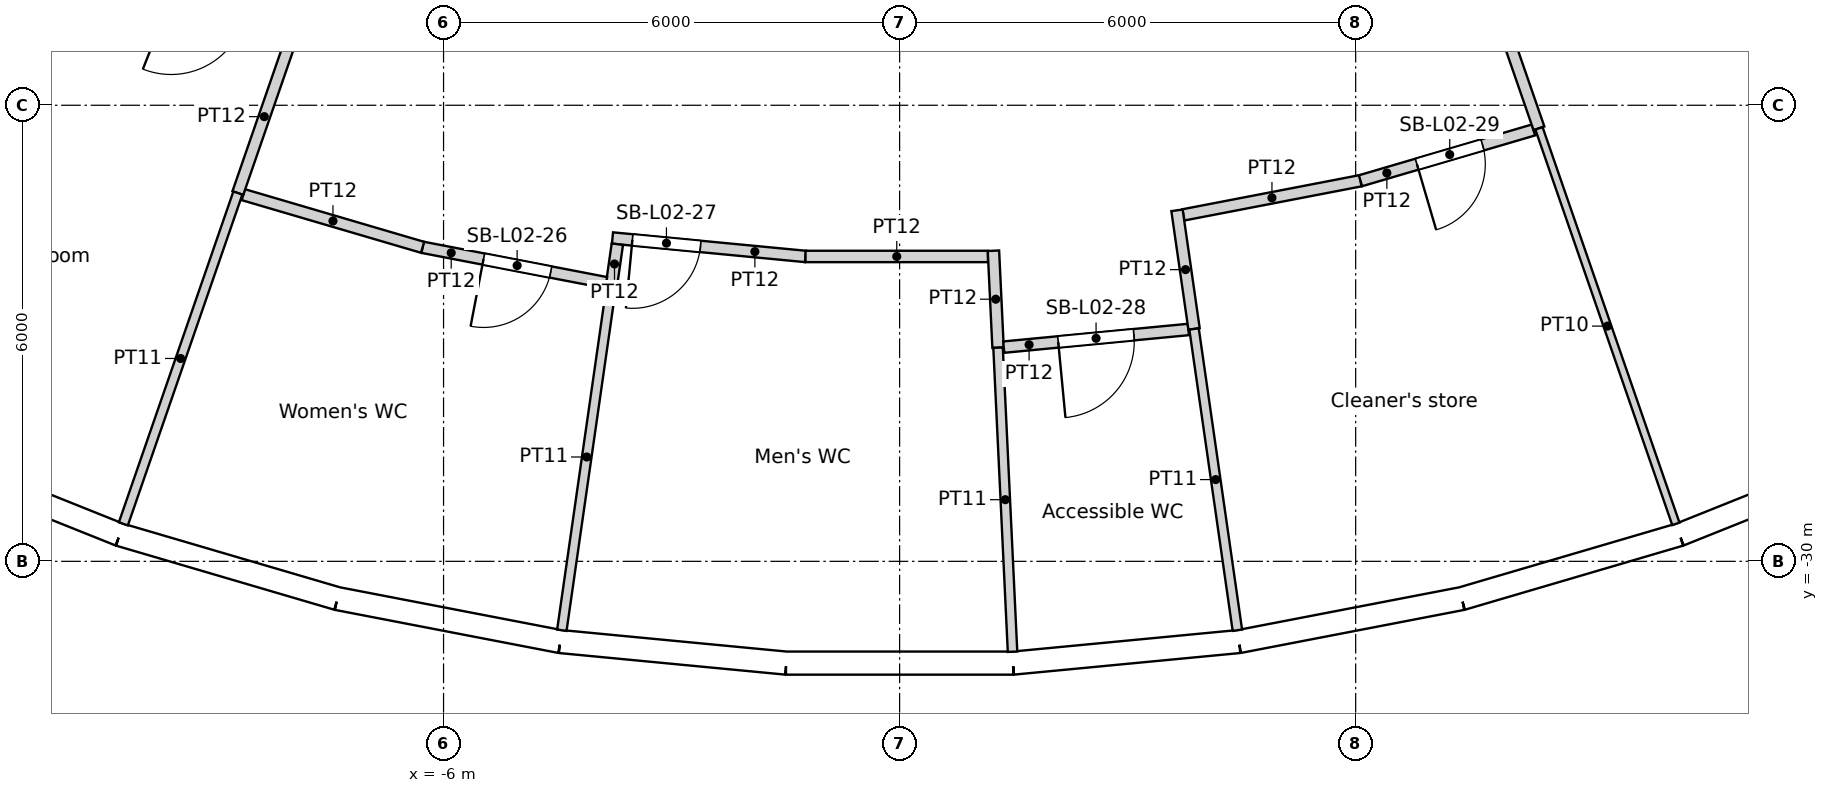
"""IFC4 building model, lengths in metres.
Left out: names, types, materials, properties, quantities, classifications, styles, units other than length and angle.
Written with IfcOpenShell. Run it as: python <this file> out.ifc"""

import sys

from ifc_helpers import new_model, si_unit, direction, frame, frame_2d, origin, origin_2d, place, context, subcontext, project, spatial, rectangle, circle, extrude, element, fill, save


model = new_model("IFC4")
c1 = context("Model", 3, precision=1e-05, world=origin(), true_north=direction((0.0, 1.0)))
c2 = subcontext(c1, "Body", "Model", "MODEL_VIEW")
j1 = project(units=[si_unit("LENGTHUNIT", "METRE"), si_unit("PLANEANGLEUNIT", "RADIAN")], contexts=[c1])
p1 = place(None, origin())
s1 = spatial("IfcSite", under=j1, at=p1, CompositionType="ELEMENT")
p2 = place(p1, origin())
s2 = spatial("IfcBuilding", under=s1, at=p2, CompositionType="ELEMENT")
p3 = place(p2, frame((0.0, 0.0, 13.8)))
s3 = spatial("IfcBuildingStorey", under=s2, at=p3, CompositionType="ELEMENT", Elevation=13.8)
for number, where, z_axis, x_axis in (
    (1, (-9.902, -28.61, 0.0), (0.0, 0.0, 1.0), (1.0, 0.0, 0.0)),
    (2, (-4.309, -29.966, 0.0), (0.0, 0.0, 1.0), (1.0, 0.0, 0.0)),
    (3, (1.44, -30.24, 0.0), (0.0, 0.0, 1.0), (1.0, 0.0, 0.0)),
    (4, (7.137, -29.421, 0.0), (0.0, 0.0, 1.0), (1.0, 0.0, 0.0)),
):
    element("IfcColumn", number, at=place(p3, frame(where, z_axis=z_axis, x_axis=x_axis)), inside=s3, PredefinedType="COLUMN", context=c2, shape_type="SweptSolid", body=[
        extrude(circle(Radius=0.7, at=origin_2d()), origin(), (0.0, 0.0, 1.0), 4.8),
    ])
for number, where, z_axis, x_axis in (
    (5, (-7.04, -23.516, 0.0), (0.0, 0.0, 1.0), (1.0, 0.0, 0.0)),
    (6, (-1.427, -24.506, 0.0), (0.0, 0.0, 1.0), (1.0, 0.0, 0.0)),
    (7, (4.263, -24.175, 0.0), (0.0, 0.0, 1.0), (1.0, 0.0, 0.0)),
):
    element("IfcColumn", number, at=place(p3, frame(where, z_axis=z_axis, x_axis=x_axis)), inside=s3, PredefinedType="COLUMN", context=c2, shape_type="SweptSolid", body=[
        extrude(circle(Radius=0.75, at=origin_2d()), origin(), (0.0, 0.0, 1.0), 4.8),
    ])
p4 = place(p3, frame((-13.033, -28.539, 0.0), z_axis=(0.0, 0.0, 1.0), x_axis=(0.928380795373, -0.371630325434, 0.0)))
e8 = element("IfcWall", 8, at=p4, inside=s3, PredefinedType="SOLIDWALL", context=c2, shape_type="SweptSolid", body=[
    extrude(rectangle(XDim=2.986, YDim=0.3, at=frame_2d((1.493, 0.0))), origin(), (0.0, 0.0, 1.0), 4.35),
])
p5 = place(p4, frame((1.493, 0.0, 2.0)))
e9 = element("IfcOpeningElement", 9, at=p5, cuts=e8, PredefinedType="OPENING", context=c2, shape_type="SweptSolid", body=[
    extrude(circle(Radius=1.2, at=origin_2d()), frame((0.0, 0.16, 0.0), z_axis=(0.0, -1.0, 0.0), x_axis=(1.0, 0.0, 0.0)), (0.0, 0.0, 1.0), 0.32),
])
p6 = place(p3, frame((-10.261, -29.649, 0.0), z_axis=(0.0, 0.0, 1.0), x_axis=(0.959502108153, -0.281701445593, 0.0)))
e10 = element("IfcWall", 10, at=p6, inside=s3, PredefinedType="SOLIDWALL", context=c2, shape_type="SweptSolid", body=[
    extrude(rectangle(XDim=2.986, YDim=0.3, at=frame_2d((1.493, 0.0))), origin(), (0.0, 0.0, 1.0), 4.35),
])
p7 = place(p6, frame((1.493, 0.0, 2.0)))
e11 = element("IfcOpeningElement", 11, at=p7, cuts=e10, PredefinedType="OPENING", context=c2, shape_type="SweptSolid", body=[
    extrude(circle(Radius=1.2, at=origin_2d()), frame((0.0, 0.16, 0.0), z_axis=(0.0, -1.0, 0.0), x_axis=(1.0, 0.0, 0.0)), (0.0, 0.0, 1.0), 0.32),
])
p8 = place(p3, frame((-7.397, -30.49, 0.0), z_axis=(0.0, 0.0, 1.0), x_axis=(0.981918853666, -0.189302310646, 0.0)))
e12 = element("IfcWall", 12, at=p8, inside=s3, PredefinedType="SOLIDWALL", context=c2, shape_type="SweptSolid", body=[
    extrude(rectangle(XDim=2.986, YDim=0.3, at=frame_2d((1.493, 0.0))), origin(), (0.0, 0.0, 1.0), 4.35),
])
p9 = place(p8, frame((1.493, 0.0, 2.0)))
e13 = element("IfcOpeningElement", 13, at=p9, cuts=e12, PredefinedType="OPENING", context=c2, shape_type="SweptSolid", body=[
    extrude(circle(Radius=1.2, at=origin_2d()), frame((0.0, 0.16, 0.0), z_axis=(0.0, -1.0, 0.0), x_axis=(1.0, 0.0, 0.0)), (0.0, 0.0, 1.0), 0.32),
])
p10 = place(p3, frame((-4.465, -31.055, 0.0), z_axis=(0.0, 0.0, 1.0), x_axis=(0.99547560533, -0.095017467833, 0.0)))
e14 = element("IfcWall", 14, at=p10, inside=s3, PredefinedType="SOLIDWALL", context=c2, shape_type="SweptSolid", body=[
    extrude(rectangle(XDim=2.986, YDim=0.3, at=frame_2d((1.493, 0.0))), origin(), (0.0, 0.0, 1.0), 4.35),
])
p11 = place(p10, frame((1.493, 0.0, 2.0)))
e15 = element("IfcOpeningElement", 15, at=p11, cuts=e14, PredefinedType="OPENING", context=c2, shape_type="SweptSolid", body=[
    extrude(circle(Radius=1.2, at=origin_2d()), frame((0.0, 0.16, 0.0), z_axis=(0.0, -1.0, 0.0), x_axis=(1.0, 0.0, 0.0)), (0.0, 0.0, 1.0), 0.32),
])
p12 = place(p3, frame((-1.493, -31.339, 0.0), z_axis=(0.0, 0.0, 1.0), x_axis=(1.0, 0.0, 0.0)))
e16 = element("IfcWall", 16, at=p12, inside=s3, PredefinedType="SOLIDWALL", context=c2, shape_type="SweptSolid", body=[
    extrude(rectangle(XDim=2.986, YDim=0.3, at=frame_2d((1.493, 0.0))), origin(), (0.0, 0.0, 1.0), 4.35),
])
p13 = place(p12, frame((1.493, 0.0, 2.0)))
e17 = element("IfcOpeningElement", 17, at=p13, cuts=e16, PredefinedType="OPENING", context=c2, shape_type="SweptSolid", body=[
    extrude(circle(Radius=1.2, at=origin_2d()), frame((0.0, 0.16, 0.0), z_axis=(0.0, -1.0, 0.0), x_axis=(1.0, 0.0, 0.0)), (0.0, 0.0, 1.0), 0.32),
])
p14 = place(p3, frame((1.493, -31.339, 0.0), z_axis=(0.0, 0.0, 1.0), x_axis=(0.99547560533, 0.095017467833, 0.0)))
e18 = element("IfcWall", 18, at=p14, inside=s3, PredefinedType="SOLIDWALL", context=c2, shape_type="SweptSolid", body=[
    extrude(rectangle(XDim=2.986, YDim=0.3, at=frame_2d((1.493, 0.0))), origin(), (0.0, 0.0, 1.0), 4.35),
])
p15 = place(p14, frame((1.493, 0.0, 2.0)))
e19 = element("IfcOpeningElement", 19, at=p15, cuts=e18, PredefinedType="OPENING", context=c2, shape_type="SweptSolid", body=[
    extrude(circle(Radius=1.2, at=origin_2d()), frame((0.0, 0.16, 0.0), z_axis=(0.0, -1.0, 0.0), x_axis=(1.0, 0.0, 0.0)), (0.0, 0.0, 1.0), 0.32),
])
p16 = place(p3, frame((4.465, -31.055, 0.0), z_axis=(0.0, 0.0, 1.0), x_axis=(0.981918853666, 0.189302310646, 0.0)))
e20 = element("IfcWall", 20, at=p16, inside=s3, PredefinedType="SOLIDWALL", context=c2, shape_type="SweptSolid", body=[
    extrude(rectangle(XDim=2.986, YDim=0.3, at=frame_2d((1.493, 0.0))), origin(), (0.0, 0.0, 1.0), 4.35),
])
p17 = place(p16, frame((1.493, 0.0, 2.0)))
e21 = element("IfcOpeningElement", 21, at=p17, cuts=e20, PredefinedType="OPENING", context=c2, shape_type="SweptSolid", body=[
    extrude(circle(Radius=1.2, at=origin_2d()), frame((0.0, 0.16, 0.0), z_axis=(0.0, -1.0, 0.0), x_axis=(1.0, 0.0, 0.0)), (0.0, 0.0, 1.0), 0.32),
])
p18 = place(p3, frame((7.397, -30.49, 0.0), z_axis=(0.0, 0.0, 1.0), x_axis=(0.959502108153, 0.281701445593, 0.0)))
e22 = element("IfcWall", 22, at=p18, inside=s3, PredefinedType="SOLIDWALL", context=c2, shape_type="SweptSolid", body=[
    extrude(rectangle(XDim=2.986, YDim=0.3, at=frame_2d((1.493, 0.0))), origin(), (0.0, 0.0, 1.0), 4.35),
])
p19 = place(p18, frame((1.493, 0.0, 2.0)))
e23 = element("IfcOpeningElement", 23, at=p19, cuts=e22, PredefinedType="OPENING", context=c2, shape_type="SweptSolid", body=[
    extrude(circle(Radius=1.2, at=origin_2d()), frame((0.0, 0.16, 0.0), z_axis=(0.0, -1.0, 0.0), x_axis=(1.0, 0.0, 0.0)), (0.0, 0.0, 1.0), 0.32),
])
p20 = place(p3, frame((10.261, -29.649, 0.0), z_axis=(0.0, 0.0, 1.0), x_axis=(0.928380795373, 0.371630325434, 0.0)))
e24 = element("IfcWall", 24, at=p20, inside=s3, PredefinedType="SOLIDWALL", context=c2, shape_type="SweptSolid", body=[
    extrude(rectangle(XDim=2.986, YDim=0.3, at=frame_2d((1.493, 0.0))), origin(), (0.0, 0.0, 1.0), 4.35),
])
p21 = place(p20, frame((1.493, 0.0, 2.0)))
e25 = element("IfcOpeningElement", 25, at=p21, cuts=e24, PredefinedType="OPENING", context=c2, shape_type="SweptSolid", body=[
    extrude(circle(Radius=1.2, at=origin_2d()), frame((0.0, 0.16, 0.0), z_axis=(0.0, -1.0, 0.0), x_axis=(1.0, 0.0, 0.0)), (0.0, 0.0, 1.0), 0.32),
])
p22 = place(p3, frame((-10.212, -29.507, 0.0), z_axis=(0.0, 0.0, 1.0), x_axis=(0.327037731194, 0.945011281613, 0.0)))
e26 = element("IfcWall", 26, at=p22, inside=s3, PredefinedType="PARTITIONING", context=c2, shape_type="SweptSolid", body=[
    extrude(rectangle(XDim=4.605, YDim=0.125, at=frame_2d((2.303, 0.0))), origin(), (0.0, 0.0, 1.0), 3.75),
])
p23 = place(p3, frame((-8.706, -25.155, 0.0), z_axis=(0.0, 0.0, 1.0), x_axis=(0.327086912916, 0.944994259982, 0.0)))
e27 = element("IfcWall", 27, at=p23, inside=s3, PredefinedType="PARTITIONING", context=c2, shape_type="SweptSolid", body=[
    extrude(rectangle(XDim=2.127, YDim=0.15, at=frame_2d((1.063, 0.0))), origin(), (0.0, 0.0, 1.0), 3.75),
])
p24 = place(p3, frame((-8.634, -25.176, 0.0), z_axis=(0.0, 0.0, 1.0), x_axis=(0.959512450636, -0.281666215713, 0.0)))
e28 = element("IfcWall", 28, at=p24, inside=s3, PredefinedType="PARTITIONING", context=c2, shape_type="SweptSolid", body=[
    extrude(rectangle(XDim=2.458, YDim=0.15, at=frame_2d((1.229, 0.0))), origin(), (0.0, 0.0, 1.0), 3.75),
])
p25 = place(p3, frame((-3.862, -26.334, 0.0), z_axis=(0.0, 0.0, 1.0), x_axis=(-0.981917073198, 0.189311545773, 0.0)))
e29 = element("IfcWall", 29, at=p25, inside=s3, PredefinedType="PARTITIONING", context=c2, shape_type="SweptSolid", body=[
    extrude(rectangle(XDim=2.458, YDim=0.15, at=frame_2d((1.229, 0.0))), origin(), (0.0, 0.0, 1.0), 3.75),
])
p26 = place(p25, frame((0.741, 0.0, 0.0)))
e30 = element("IfcOpeningElement", 30, at=p26, cuts=e29, PredefinedType="OPENING", context=c2, shape_type="SweptSolid", body=[
    extrude(rectangle(XDim=0.9, YDim=2.1, at=frame_2d((0.45, 1.05))), frame((0.0, 0.075, 0.0), z_axis=(0.0, -1.0, 0.0), x_axis=(1.0, 0.0, 0.0)), (0.0, 0.0, 1.0), 0.15),
])
p27 = place(p3, frame((-4.444, -30.906, 0.0), z_axis=(0.0, 0.0, 1.0), x_axis=(0.142289671733, 0.989825059957, 0.0)))
e31 = element("IfcWall", 31, at=p27, inside=s3, PredefinedType="PARTITIONING", context=c2, shape_type="SweptSolid", body=[
    extrude(rectangle(XDim=4.605, YDim=0.125, at=frame_2d((2.303, 0.0))), origin(), (0.0, 0.0, 1.0), 3.75),
])
p28 = place(p3, frame((-3.788, -26.348, 0.0), z_axis=(0.0, 0.0, 1.0), x_axis=(0.142526194345, 0.989791030433, 0.0)))
e32 = element("IfcWall", 32, at=p28, inside=s3, PredefinedType="PARTITIONING", context=c2, shape_type="SweptSolid", body=[
    extrude(rectangle(XDim=0.526, YDim=0.15, at=frame_2d((0.263, 0.0))), origin(), (0.0, 0.0, 1.0), 3.75),
])
p29 = place(p3, frame((-1.238, -25.989, 0.0), z_axis=(0.0, 0.0, 1.0), x_axis=(-0.995465314717, 0.095125218499, 0.0)))
e33 = element("IfcWall", 33, at=p29, inside=s3, PredefinedType="PARTITIONING", context=c2, shape_type="SweptSolid", body=[
    extrude(rectangle(XDim=2.551, YDim=0.15, at=frame_2d((1.275, 0.0))), origin(), (0.0, 0.0, 1.0), 3.75),
])
p30 = place(p29, frame((1.388, 0.0, 0.0)))
e34 = element("IfcOpeningElement", 34, at=p30, cuts=e33, PredefinedType="OPENING", context=c2, shape_type="SweptSolid", body=[
    extrude(rectangle(XDim=0.9, YDim=2.1, at=frame_2d((0.45, 1.05))), frame((0.0, 0.075, 0.0), z_axis=(0.0, -1.0, 0.0), x_axis=(1.0, 0.0, 0.0)), (0.0, 0.0, 1.0), 0.15),
])
p31 = place(p3, frame((-1.238, -25.989, 0.0), z_axis=(0.0, 0.0, 1.0), x_axis=(1.0, 0.0, 0.0)))
e35 = element("IfcWall", 35, at=p31, inside=s3, PredefinedType="PARTITIONING", context=c2, shape_type="SweptSolid", body=[
    extrude(rectangle(XDim=2.401, YDim=0.15, at=frame_2d((1.201, 0.0))), origin(), (0.0, 0.0, 1.0), 3.75),
])
p32 = place(p3, frame((1.295, -27.189, 0.0), z_axis=(0.0, 0.0, 1.0), x_axis=(-0.047628765126, 0.998865106375, 0.0)))
e36 = element("IfcWall", 36, at=p32, inside=s3, PredefinedType="PARTITIONING", context=c2, shape_type="SweptSolid", body=[
    extrude(rectangle(XDim=1.276, YDim=0.15, at=frame_2d((0.638, 0.0))), origin(), (0.0, 0.0, 1.0), 3.75),
])
p33 = place(p3, frame((3.799, -26.95, 0.0), z_axis=(0.0, 0.0, 1.0), x_axis=(-0.995463491179, -0.095144299509, 0.0)))
e37 = element("IfcWall", 37, at=p33, inside=s3, PredefinedType="PARTITIONING", context=c2, shape_type="SweptSolid", body=[
    extrude(rectangle(XDim=2.44, YDim=0.15, at=frame_2d((1.22, 0.0))), origin(), (0.0, 0.0, 1.0), 3.75),
])
p34 = place(p33, frame((0.72, 0.0, 0.0)))
e38 = element("IfcOpeningElement", 38, at=p34, cuts=e37, PredefinedType="OPENING", context=c2, shape_type="SweptSolid", body=[
    extrude(rectangle(XDim=1.0, YDim=2.1, at=frame_2d((0.5, 1.05))), frame((0.0, 0.075, 0.0), z_axis=(0.0, -1.0, 0.0), x_axis=(1.0, 0.0, 0.0)), (0.0, 0.0, 1.0), 0.15),
])
p35 = place(p3, frame((1.486, -31.189, 0.0), z_axis=(0.0, 0.0, 1.0), x_axis=(-0.047553563093, 0.998868689387, 0.0)))
e39 = element("IfcWall", 39, at=p35, inside=s3, PredefinedType="PARTITIONING", context=c2, shape_type="SweptSolid", body=[
    extrude(rectangle(XDim=4.005, YDim=0.125, at=frame_2d((2.002, 0.0))), origin(), (0.0, 0.0, 1.0), 3.75),
])
p36 = place(p3, frame((3.734, -25.442, 0.0), z_axis=(0.0, 0.0, 1.0), x_axis=(0.981930031272, 0.189244322732, 0.0)))
e40 = element("IfcWall", 40, at=p36, inside=s3, PredefinedType="PARTITIONING", context=c2, shape_type="SweptSolid", body=[
    extrude(rectangle(XDim=2.373, YDim=0.15, at=frame_2d((1.186, 0.0))), origin(), (0.0, 0.0, 1.0), 3.75),
])
p37 = place(p3, frame((3.874, -26.943, 0.0), z_axis=(0.0, 0.0, 1.0), x_axis=(-0.142310157012, 0.989822114933, 0.0)))
e41 = element("IfcWall", 41, at=p37, inside=s3, PredefinedType="PARTITIONING", context=c2, shape_type="SweptSolid", body=[
    extrude(rectangle(XDim=1.577, YDim=0.15, at=frame_2d((0.788, 0.0))), origin(), (0.0, 0.0, 1.0), 3.75),
])
p38 = place(p3, frame((4.444, -30.906, 0.0), z_axis=(0.0, 0.0, 1.0), x_axis=(-0.142291879115, 0.989824742638, 0.0)))
e42 = element("IfcWall", 42, at=p38, inside=s3, PredefinedType="PARTITIONING", context=c2, shape_type="SweptSolid", body=[
    extrude(rectangle(XDim=4.005, YDim=0.125, at=frame_2d((2.002, 0.0))), origin(), (0.0, 0.0, 1.0), 3.75),
])
p39 = place(p3, frame((8.34, -24.325, 0.0), z_axis=(0.0, 0.0, 1.0), x_axis=(-0.959486670527, -0.281754022298, 0.0)))
e43 = element("IfcWall", 43, at=p39, inside=s3, PredefinedType="PARTITIONING", context=c2, shape_type="SweptSolid", body=[
    extrude(rectangle(XDim=2.373, YDim=0.15, at=frame_2d((1.186, 0.0))), origin(), (0.0, 0.0, 1.0), 3.75),
])
p40 = place(p39, frame((0.698, 0.0, 0.0)))
e44 = element("IfcOpeningElement", 44, at=p40, cuts=e43, PredefinedType="OPENING", context=c2, shape_type="SweptSolid", body=[
    extrude(rectangle(XDim=0.9, YDim=2.1, at=frame_2d((0.45, 1.05))), frame((0.0, 0.075, 0.0), z_axis=(0.0, -1.0, 0.0), x_axis=(1.0, 0.0, 0.0)), (0.0, 0.0, 1.0), 0.15),
])
p41 = place(p3, frame((8.412, -24.304, 0.0), z_axis=(0.0, 0.0, 1.0), x_axis=(-0.327062634601, 0.945002662985, 0.0)))
e45 = element("IfcWall", 45, at=p41, inside=s3, PredefinedType="PARTITIONING", context=c2, shape_type="SweptSolid", body=[
    extrude(rectangle(XDim=12.597, YDim=0.15, at=frame_2d((6.298, 0.0))), origin(), (0.0, 0.0, 1.0), 3.75),
])
p42 = place(p3, frame((10.212, -29.507, 0.0), z_axis=(0.0, 0.0, 1.0), x_axis=(-0.327048124724, 0.945007684685, 0.0)))
e46 = element("IfcWall", 46, at=p42, inside=s3, PredefinedType="PARTITIONING", context=c2, shape_type="SweptSolid", body=[
    extrude(rectangle(XDim=5.506, YDim=0.1, at=frame_2d((2.753, 0.0))), origin(), (0.0, 0.0, 1.0), 3.75),
])
p43 = place(p5, origin())
e47 = element("IfcWindow", 47, at=p43, inside=s3, PartitioningType="SINGLE_PANEL", PredefinedType="WINDOW", context=c2, shape_type="SweptSolid", body=[
    extrude(circle(Radius=1.2, at=origin_2d()), frame((0.0, 0.12, 0.0), z_axis=(0.0, -1.0, 0.0), x_axis=(1.0, 0.0, 0.0)), (0.0, 0.0, 1.0), 0.1),
])
fill(e9, e47)
p44 = place(p7, origin())
e48 = element("IfcWindow", 48, at=p44, inside=s3, PartitioningType="SINGLE_PANEL", PredefinedType="WINDOW", context=c2, shape_type="SweptSolid", body=[
    extrude(circle(Radius=1.2, at=origin_2d()), frame((0.0, 0.12, 0.0), z_axis=(0.0, -1.0, 0.0), x_axis=(1.0, 0.0, 0.0)), (0.0, 0.0, 1.0), 0.1),
])
fill(e11, e48)
p45 = place(p9, origin())
e49 = element("IfcWindow", 49, at=p45, inside=s3, PartitioningType="SINGLE_PANEL", PredefinedType="WINDOW", context=c2, shape_type="SweptSolid", body=[
    extrude(circle(Radius=1.2, at=origin_2d()), frame((0.0, 0.12, 0.0), z_axis=(0.0, -1.0, 0.0), x_axis=(1.0, 0.0, 0.0)), (0.0, 0.0, 1.0), 0.1),
])
fill(e13, e49)
p46 = place(p11, origin())
e50 = element("IfcWindow", 50, at=p46, inside=s3, PartitioningType="SINGLE_PANEL", PredefinedType="WINDOW", context=c2, shape_type="SweptSolid", body=[
    extrude(circle(Radius=1.2, at=origin_2d()), frame((0.0, 0.12, 0.0), z_axis=(0.0, -1.0, 0.0), x_axis=(1.0, 0.0, 0.0)), (0.0, 0.0, 1.0), 0.1),
])
fill(e15, e50)
p47 = place(p13, origin())
e51 = element("IfcWindow", 51, at=p47, inside=s3, PartitioningType="SINGLE_PANEL", PredefinedType="WINDOW", context=c2, shape_type="SweptSolid", body=[
    extrude(circle(Radius=1.2, at=origin_2d()), frame((0.0, 0.12, 0.0), z_axis=(0.0, -1.0, 0.0), x_axis=(1.0, 0.0, 0.0)), (0.0, 0.0, 1.0), 0.1),
])
fill(e17, e51)
p48 = place(p15, origin())
e52 = element("IfcWindow", 52, at=p48, inside=s3, PartitioningType="SINGLE_PANEL", PredefinedType="WINDOW", context=c2, shape_type="SweptSolid", body=[
    extrude(circle(Radius=1.2, at=origin_2d()), frame((0.0, 0.12, 0.0), z_axis=(0.0, -1.0, 0.0), x_axis=(1.0, 0.0, 0.0)), (0.0, 0.0, 1.0), 0.1),
])
fill(e19, e52)
p49 = place(p17, origin())
e53 = element("IfcWindow", 53, at=p49, inside=s3, PartitioningType="SINGLE_PANEL", PredefinedType="WINDOW", context=c2, shape_type="SweptSolid", body=[
    extrude(circle(Radius=1.2, at=origin_2d()), frame((0.0, 0.12, 0.0), z_axis=(0.0, -1.0, 0.0), x_axis=(1.0, 0.0, 0.0)), (0.0, 0.0, 1.0), 0.1),
])
fill(e21, e53)
p50 = place(p19, origin())
e54 = element("IfcWindow", 54, at=p50, inside=s3, PartitioningType="SINGLE_PANEL", PredefinedType="WINDOW", context=c2, shape_type="SweptSolid", body=[
    extrude(circle(Radius=1.2, at=origin_2d()), frame((0.0, 0.12, 0.0), z_axis=(0.0, -1.0, 0.0), x_axis=(1.0, 0.0, 0.0)), (0.0, 0.0, 1.0), 0.1),
])
fill(e23, e54)
p51 = place(p21, origin())
e55 = element("IfcWindow", 55, at=p51, inside=s3, PartitioningType="SINGLE_PANEL", PredefinedType="WINDOW", context=c2, shape_type="SweptSolid", body=[
    extrude(circle(Radius=1.2, at=origin_2d()), frame((0.0, 0.12, 0.0), z_axis=(0.0, -1.0, 0.0), x_axis=(1.0, 0.0, 0.0)), (0.0, 0.0, 1.0), 0.1),
])
fill(e25, e55)
p52 = place(p26, origin())
e56 = element("IfcDoor", 56, at=p52, inside=s3, OperationType="SINGLE_SWING_RIGHT", PredefinedType="DOOR", context=c2, shape_type="SweptSolid", body=[
    extrude(rectangle(XDim=0.9, YDim=2.1, at=frame_2d((0.45, 1.05))), frame((0.0, 0.025, 0.0), z_axis=(0.0, -1.0, 0.0), x_axis=(1.0, 0.0, 0.0)), (0.0, 0.0, 1.0), 0.05),
])
fill(e30, e56)
p53 = place(p30, origin())
e57 = element("IfcDoor", 57, at=p53, inside=s3, OperationType="SINGLE_SWING_RIGHT", PredefinedType="DOOR", context=c2, shape_type="SweptSolid", body=[
    extrude(rectangle(XDim=0.9, YDim=2.1, at=frame_2d((0.45, 1.05))), frame((0.0, 0.025, 0.0), z_axis=(0.0, -1.0, 0.0), x_axis=(1.0, 0.0, 0.0)), (0.0, 0.0, 1.0), 0.05),
])
fill(e34, e57)
p54 = place(p34, origin())
e58 = element("IfcDoor", 58, at=p54, inside=s3, OperationType="SINGLE_SWING_RIGHT", PredefinedType="DOOR", context=c2, shape_type="SweptSolid", body=[
    extrude(rectangle(XDim=1.0, YDim=2.1, at=frame_2d((0.5, 1.05))), frame((0.0, 0.025, 0.0), z_axis=(0.0, -1.0, 0.0), x_axis=(1.0, 0.0, 0.0)), (0.0, 0.0, 1.0), 0.05),
])
fill(e38, e58)
p55 = place(p40, origin())
e59 = element("IfcDoor", 59, at=p55, inside=s3, OperationType="SINGLE_SWING_RIGHT", PredefinedType="DOOR", context=c2, shape_type="SweptSolid", body=[
    extrude(rectangle(XDim=0.9, YDim=2.1, at=frame_2d((0.45, 1.05))), frame((0.0, 0.025, 0.0), z_axis=(0.0, -1.0, 0.0), x_axis=(1.0, 0.0, 0.0)), (0.0, 0.0, 1.0), 0.05),
])
fill(e44, e59)
save(model, sys.argv[1])
